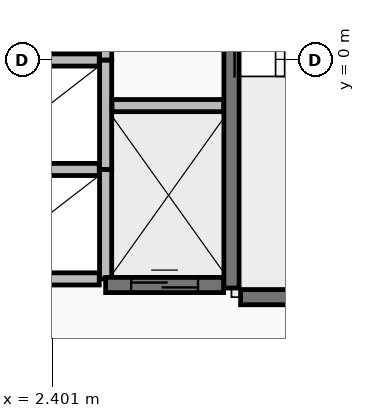
"""IFC4 building model, lengths in metres.
Left out: names, types, materials, properties, quantities, classifications, styles, units other than length and angle.
Written with IfcOpenShell. Run it as: python <this file> out.ifc"""

import sys

from ifc_helpers import new_model, si_unit, direction, frame, frame_2d, origin, place, context, subcontext, project, spatial, rectangle, extrude, element, fill, save


model = new_model("IFC4")
c1 = context("Model", 3, precision=1e-05, world=origin(), true_north=direction((0.0, 1.0)))
c2 = subcontext(c1, "Body", "Model", "MODEL_VIEW")
j1 = project(units=[si_unit("LENGTHUNIT", "METRE"), si_unit("PLANEANGLEUNIT", "RADIAN")], contexts=[c1])
p1 = place(None, origin())
s1 = spatial("IfcSite", under=j1, at=p1, CompositionType="ELEMENT")
p2 = place(p1, origin())
s2 = spatial("IfcBuilding", under=s1, at=p2, CompositionType="ELEMENT")
p3 = place(p2, frame((0.0, 0.0, 196.85)))
s3 = spatial("IfcBuildingStorey", under=s2, at=p3, CompositionType="ELEMENT", Elevation=196.85)
p4 = place(p3, frame((5.35, -3.75, 0.0), z_axis=(0.0, 0.0, 1.0), x_axis=(0.0, 1.0, 0.0)))
e1 = element("IfcWall", 1, at=p4, inside=s3, PredefinedType="SHEAR", context=c2, shape_type="SweptSolid", body=[
    extrude(rectangle(XDim=7.3, YDim=0.25, at=frame_2d((3.65, 0.0))), origin(), (0.0, 0.0, 1.0), 3.42),
])
p5 = place(p3, frame((5.5, -3.9, 0.0), z_axis=(0.0, 0.0, 1.0), x_axis=(1.0, 0.0, 0.0)))
e2 = element("IfcWall", 2, at=p5, inside=s3, PredefinedType="SHEAR", context=c2, shape_type="SweptSolid", body=[
    extrude(rectangle(XDim=3.0, YDim=0.25, at=frame_2d((1.5, 0.0))), origin(), (0.0, 0.0, 1.0), 3.42),
])
p6 = place(p3, frame((3.28, -3.6, 0.0), z_axis=(0.0, 0.0, 1.0), x_axis=(0.0, 1.0, 0.0)))
e3 = element("IfcWall", 3, at=p6, inside=s3, PredefinedType="PARTITIONING", context=c2, shape_type="SweptSolid", body=[
    extrude(rectangle(XDim=1.8, YDim=0.2, at=frame_2d((0.9, 0.0))), origin(), (0.0, 0.0, 1.0), 3.42),
])
for number, where, z_axis, x_axis in (
    (4, (1.13, -3.6, 0.0), (0.0, 0.0, 1.0), (1.0, 0.0, 0.0)),
    (5, (1.13, -1.8, 0.0), (0.0, 0.0, 1.0), (1.0, 0.0, 0.0)),
):
    element("IfcWall", number, at=place(p3, frame(where, z_axis=z_axis, x_axis=x_axis)), inside=s3, PredefinedType="PARTITIONING", context=c2, shape_type="SweptSolid", body=[
        extrude(rectangle(XDim=2.045, YDim=0.2, at=frame_2d((1.022, 0.0))), origin(), (0.0, 0.0, 1.0), 3.42),
    ])
p7 = place(p3, frame((3.28, -1.8, 0.0), z_axis=(0.0, 0.0, 1.0), x_axis=(0.0, 1.0, 0.0)))
e6 = element("IfcWall", 6, at=p7, inside=s3, PredefinedType="PARTITIONING", context=c2, shape_type="SweptSolid", body=[
    extrude(rectangle(XDim=1.8, YDim=0.2, at=frame_2d((0.9, 0.0))), origin(), (0.0, 0.0, 1.0), 3.42),
])
p8 = place(p3, frame((1.13, 0.0, 0.0), z_axis=(0.0, 0.0, 1.0), x_axis=(1.0, 0.0, 0.0)))
e7 = element("IfcWall", 7, at=p8, inside=s3, PredefinedType="PARTITIONING", context=c2, shape_type="SweptSolid", body=[
    extrude(rectangle(XDim=2.045, YDim=0.2, at=frame_2d((1.022, 0.0))), origin(), (0.0, 0.0, 1.0), 3.42),
])
p9 = place(p3, frame((3.28, 0.0, 0.0), z_axis=(0.0, 0.0, 1.0), x_axis=(0.0, 1.0, 0.0)))
e8 = element("IfcWall", 8, at=p9, inside=s3, PredefinedType="PARTITIONING", context=c2, shape_type="SweptSolid", body=[
    extrude(rectangle(XDim=1.8, YDim=0.2, at=frame_2d((0.9, 0.0))), origin(), (0.0, 0.0, 1.0), 3.42),
])
p10 = place(p3, frame((3.28, -3.7, 0.0), z_axis=(0.0, 0.0, 1.0), x_axis=(1.0, 0.0, 0.0)))
e9 = element("IfcWall", 9, at=p10, inside=s3, PredefinedType="SHEAR", context=c2, shape_type="SweptSolid", body=[
    extrude(rectangle(XDim=1.94, YDim=0.25, at=frame_2d((0.97, 0.0))), origin(), (0.0, 0.0, 1.0), 3.42),
])
p11 = place(p10, frame((0.42, 0.0, 0.0)))
e10 = element("IfcOpeningElement", 10, at=p11, cuts=e9, PredefinedType="OPENING", context=c2, shape_type="SweptSolid", body=[
    extrude(rectangle(XDim=1.1, YDim=2.2, at=frame_2d((0.55, 1.1))), frame((0.0, 0.135, 0.0), z_axis=(0.0, -1.0, 0.0), x_axis=(1.0, 0.0, 0.0)), (0.0, 0.0, 1.0), 0.27),
])
p12 = place(p3, frame((3.385, -0.75, 0.0), z_axis=(0.0, 0.0, 1.0), x_axis=(1.0, 0.0, 0.0)))
e11 = element("IfcWall", 11, at=p12, inside=s3, PredefinedType="PARTITIONING", context=c2, shape_type="SweptSolid", body=[
    extrude(rectangle(XDim=1.835, YDim=0.2, at=frame_2d((0.917, 0.0))), origin(), (0.0, 0.0, 1.0), 3.42),
])
p13 = place(p11, origin())
e12 = element("IfcDoor", 12, at=p13, inside=s3, OperationType="SLIDING_TO_LEFT", PredefinedType="DOOR", context=c2, shape_type="SweptSolid", body=[
    extrude(rectangle(XDim=1.1, YDim=2.2, at=frame_2d((0.55, 1.1))), frame((0.0, 0.025, 0.0), z_axis=(0.0, -1.0, 0.0), x_axis=(1.0, 0.0, 0.0)), (0.0, 0.0, 1.0), 0.05),
])
fill(e10, e12)
save(model, sys.argv[1])
